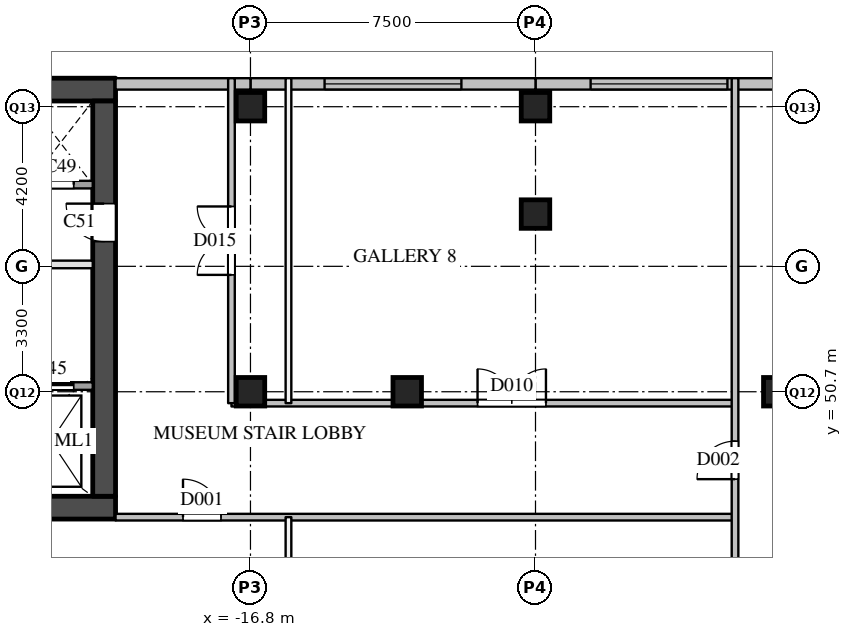
"""IFC4 building model, lengths in metres.
Left out: names, types, materials, properties, quantities, classifications, styles, units other than length and angle.
Written with IfcOpenShell. Run it as: python <this file> out.ifc"""

import sys

from ifc_helpers import new_model, si_unit, direction, frame, frame_2d, origin, origin_2d, place, context, subcontext, project, spatial, rectangle, extrude, element, fill, save


model = new_model("IFC4")
c1 = context("Model", 3, precision=1e-05, world=origin(), true_north=direction((0.0, 1.0)))
c2 = subcontext(c1, "Body", "Model", "MODEL_VIEW")
j1 = project(units=[si_unit("LENGTHUNIT", "METRE"), si_unit("PLANEANGLEUNIT", "RADIAN")], contexts=[c1])
p1 = place(None, origin())
s1 = spatial("IfcSite", under=j1, at=p1, CompositionType="ELEMENT")
p2 = place(p1, origin())
s2 = spatial("IfcBuilding", under=s1, at=p2, CompositionType="ELEMENT")
p3 = place(p2, frame((0.0, 0.0, 21.0)))
s3 = spatial("IfcBuildingStorey", under=s2, at=p3, CompositionType="ELEMENT", Elevation=21.0)
for number, where, z_axis, x_axis in (
    (1, (-16.8, 50.7, 0.0), (0.0, 0.0, 1.0), (1.0, 0.0, 0.0)),
    (2, (-16.8, 58.2, 0.0), (0.0, 0.0, 1.0), (1.0, 0.0, 0.0)),
    (3, (-9.3, 58.2, 0.0), (0.0, 0.0, 1.0), (1.0, 0.0, 0.0)),
    (4, (-12.675, 50.7, 0.0), (0.0, 0.0, 1.0), (1.0, 0.0, 0.0)),
    (5, (-9.3, 55.375, 0.0), (0.0, 0.0, 1.0), (1.0, 0.0, 0.0)),
    (6, (-2.925, 50.7, 0.0), (0.0, 0.0, 1.0), (1.0, 0.0, 0.0)),
):
    element("IfcColumn", number, at=place(p3, frame(where, z_axis=z_axis, x_axis=x_axis)), inside=s3, PredefinedType="COLUMN", context=c2, shape_type="SweptSolid", body=[
        extrude(rectangle(XDim=0.75, YDim=0.75, at=origin_2d()), origin(), (0.0, 0.0, 1.0), 5.0),
    ])
p4 = place(p3, frame((-1.8, 58.8, 0.0), z_axis=(0.0, 0.0, 1.0), x_axis=(-1.0, 0.0, 0.0)))
e7 = element("IfcWall", 7, at=p4, inside=s3, PredefinedType="SOLIDWALL", context=c2, shape_type="SweptSolid", body=[
    extrude(rectangle(XDim=7.5, YDim=0.3, at=frame_2d((3.75, 0.0))), origin(), (0.0, 0.0, 1.0), 4.59),
])
p5 = place(p4, frame((2.45, 0.0, 2.4)))
e8 = element("IfcOpeningElement", 8, at=p5, cuts=e7, PredefinedType="OPENING", context=c2, shape_type="SweptSolid", body=[
    extrude(rectangle(XDim=3.6, YDim=1.2, at=frame_2d((1.8, 0.6))), frame((0.0, 0.16, 0.0), z_axis=(0.0, -1.0, 0.0), x_axis=(1.0, 0.0, 0.0)), (0.0, 0.0, 1.0), 0.32),
])
p6 = place(p3, frame((-9.3, 58.8, 0.0), z_axis=(0.0, 0.0, 1.0), x_axis=(-1.0, 0.0, 0.0)))
e9 = element("IfcWall", 9, at=p6, inside=s3, PredefinedType="SOLIDWALL", context=c2, shape_type="SweptSolid", body=[
    extrude(rectangle(XDim=7.5, YDim=0.3, at=frame_2d((3.75, 0.0))), origin(), (0.0, 0.0, 1.0), 4.59),
])
p7 = place(p6, frame((1.95, 0.0, 2.4)))
e10 = element("IfcOpeningElement", 10, at=p7, cuts=e9, PredefinedType="OPENING", context=c2, shape_type="SweptSolid", body=[
    extrude(rectangle(XDim=3.6, YDim=1.2, at=frame_2d((1.8, 0.6))), frame((0.0, 0.16, 0.0), z_axis=(0.0, -1.0, 0.0), x_axis=(1.0, 0.0, 0.0)), (0.0, 0.0, 1.0), 0.32),
])
p8 = place(p3, frame((-16.8, 58.8, 0.0), z_axis=(0.0, 0.0, 1.0), x_axis=(-1.0, 0.0, 0.0)))
e11 = element("IfcWall", 11, at=p8, inside=s3, PredefinedType="SOLIDWALL", context=c2, shape_type="SweptSolid", body=[
    extrude(rectangle(XDim=3.55, YDim=0.3, at=frame_2d((1.775, 0.0))), origin(), (0.0, 0.0, 1.0), 4.59),
])
p9 = place(p3, frame((-32.55, 47.65, 0.0), z_axis=(0.0, 0.0, 1.0), x_axis=(1.0, 0.0, 0.0)))
e12 = element("IfcWall", 12, at=p9, inside=s3, PredefinedType="SHEAR", context=c2, shape_type="SweptSolid", body=[
    extrude(rectangle(XDim=12.2, YDim=0.6, at=frame_2d((6.1, 0.0))), origin(), (0.0, 0.0, 1.0), 4.55),
])
p10 = place(p9, frame((8.0, 0.0, 0.0)))
e13 = element("IfcOpeningElement", 13, at=p10, cuts=e12, PredefinedType="OPENING", context=c2, shape_type="SweptSolid", body=[
    extrude(rectangle(XDim=0.7, YDim=2.1, at=frame_2d((0.35, 1.05))), frame((0.0, 0.31, 0.0), z_axis=(0.0, -1.0, 0.0), x_axis=(1.0, 0.0, 0.0)), (0.0, 0.0, 1.0), 0.62),
])
p11 = place(p3, frame((-32.55, 58.65, 0.0), z_axis=(0.0, 0.0, 1.0), x_axis=(1.0, 0.0, 0.0)))
e14 = element("IfcWall", 14, at=p11, inside=s3, PredefinedType="SHEAR", context=c2, shape_type="SweptSolid", body=[
    extrude(rectangle(XDim=12.2, YDim=0.6, at=frame_2d((6.1, 0.0))), origin(), (0.0, 0.0, 1.0), 4.55),
])
p12 = place(p3, frame((-20.65, 47.95, 0.0), z_axis=(0.0, 0.0, 1.0), x_axis=(0.0, 1.0, 0.0)))
e15 = element("IfcWall", 15, at=p12, inside=s3, PredefinedType="SHEAR", context=c2, shape_type="SweptSolid", body=[
    extrude(rectangle(XDim=10.4, YDim=0.6, at=frame_2d((5.2, 0.0))), origin(), (0.0, 0.0, 1.0), 4.55),
])
p13 = place(p12, frame((6.7, 0.0, 0.0)))
e16 = element("IfcOpeningElement", 16, at=p13, cuts=e15, PredefinedType="OPENING", context=c2, shape_type="SweptSolid", body=[
    extrude(rectangle(XDim=1.0, YDim=2.1, at=frame_2d((0.5, 1.05))), frame((0.0, 0.31, 0.0), z_axis=(0.0, -1.0, 0.0), x_axis=(1.0, 0.0, 0.0)), (0.0, 0.0, 1.0), 0.62),
])
p14 = place(p3, frame((-25.25, 50.85, 0.0), z_axis=(0.0, 0.0, 1.0), x_axis=(1.0, 0.0, 0.0)))
e17 = element("IfcWall", 17, at=p14, inside=s3, PredefinedType="SOLIDWALL", context=c2, shape_type="SweptSolid", body=[
    extrude(rectangle(XDim=4.3, YDim=0.2, at=frame_2d((2.15, 0.0))), origin(), (0.0, 0.0, 1.0), 4.55),
])
p15 = place(p14, frame((2.6, 0.0, 0.0)))
e18 = element("IfcOpeningElement", 18, at=p15, cuts=e17, PredefinedType="OPENING", context=c2, shape_type="SweptSolid", body=[
    extrude(rectangle(XDim=1.2, YDim=2.1, at=frame_2d((0.6, 1.05))), frame((0.0, 0.11, 0.0), z_axis=(0.0, -1.0, 0.0), x_axis=(1.0, 0.0, 0.0)), (0.0, 0.0, 1.0), 0.22),
])
p16 = place(p3, frame((-25.25, 54.05, 0.0), z_axis=(0.0, 0.0, 1.0), x_axis=(1.0, 0.0, 0.0)))
e19 = element("IfcWall", 19, at=p16, inside=s3, PredefinedType="PARTITIONING", context=c2, shape_type="SweptSolid", body=[
    extrude(rectangle(XDim=4.3, YDim=0.2, at=frame_2d((2.15, 0.0))), origin(), (0.0, 0.0, 1.0), 4.55),
])
p17 = place(p16, frame((1.25, 0.0, 0.0)))
e20 = element("IfcOpeningElement", 20, at=p17, cuts=e19, PredefinedType="OPENING", context=c2, shape_type="SweptSolid", body=[
    extrude(rectangle(XDim=1.8, YDim=2.1, at=frame_2d((0.9, 1.05))), frame((0.0, 0.11, 0.0), z_axis=(0.0, -1.0, 0.0), x_axis=(1.0, 0.0, 0.0)), (0.0, 0.0, 1.0), 0.22),
])
p18 = place(p3, frame((-22.65, 56.15, 0.0), z_axis=(0.0, 0.0, 1.0), x_axis=(1.0, 0.0, 0.0)))
e21 = element("IfcWall", 21, at=p18, inside=s3, PredefinedType="SOLIDWALL", context=c2, shape_type="SweptSolid", body=[
    extrude(rectangle(XDim=1.7, YDim=0.2, at=frame_2d((0.85, 0.0))), origin(), (0.0, 0.0, 1.0), 4.55),
])
p19 = place(p18, frame((0.5, 0.0, 0.0)))
e22 = element("IfcOpeningElement", 22, at=p19, cuts=e21, PredefinedType="OPENING", context=c2, shape_type="SweptSolid", body=[
    extrude(rectangle(XDim=0.7, YDim=2.1, at=frame_2d((0.35, 1.05))), frame((0.0, 0.11, 0.0), z_axis=(0.0, -1.0, 0.0), x_axis=(1.0, 0.0, 0.0)), (0.0, 0.0, 1.0), 0.22),
])
p20 = place(p3, frame((-20.35, 47.4, 0.0), z_axis=(0.0, 0.0, 1.0), x_axis=(1.0, 0.0, 0.0)))
e23 = element("IfcWall", 23, at=p20, inside=s3, PredefinedType="PARTITIONING", context=c2, shape_type="SweptSolid", body=[
    extrude(rectangle(XDim=16.3, YDim=0.175, at=frame_2d((8.15, 0.0))), origin(), (0.0, 0.0, 1.0), 3.79),
])
p21 = place(p20, frame((1.775, 0.0, 0.0)))
e24 = element("IfcOpeningElement", 24, at=p21, cuts=e23, PredefinedType="OPENING", context=c2, shape_type="SweptSolid", body=[
    extrude(rectangle(XDim=1.0, YDim=2.1, at=frame_2d((0.5, 1.05))), frame((0.0, 0.097, 0.0), z_axis=(0.0, -1.0, 0.0), x_axis=(1.0, 0.0, 0.0)), (0.0, 0.0, 1.0), 0.195),
])
p22 = place(p3, frame((-17.3, 50.4, 0.0), z_axis=(0.0, 0.0, 1.0), x_axis=(1.0, 0.0, 0.0)))
e25 = element("IfcWall", 25, at=p22, inside=s3, PredefinedType="PARTITIONING", context=c2, shape_type="SweptSolid", body=[
    extrude(rectangle(XDim=13.25, YDim=0.175, at=frame_2d((6.625, 0.0))), origin(), (0.0, 0.0, 1.0), 4.55),
])
p23 = place(p22, frame((6.475, 0.0, 0.0)))
e26 = element("IfcOpeningElement", 26, at=p23, cuts=e25, PredefinedType="OPENING", context=c2, shape_type="SweptSolid", body=[
    extrude(rectangle(XDim=1.8, YDim=2.1, at=frame_2d((0.9, 1.05))), frame((0.0, 0.097, 0.0), z_axis=(0.0, -1.0, 0.0), x_axis=(1.0, 0.0, 0.0)), (0.0, 0.0, 1.0), 0.195),
])
p24 = place(p3, frame((-17.3, 50.4, 0.0), z_axis=(0.0, 0.0, 1.0), x_axis=(0.0, 1.0, 0.0)))
e27 = element("IfcWall", 27, at=p24, inside=s3, PredefinedType="PARTITIONING", context=c2, shape_type="SweptSolid", body=[
    extrude(rectangle(XDim=8.55, YDim=0.175, at=frame_2d((4.275, 0.0))), origin(), (0.0, 0.0, 1.0), 3.79),
])
p25 = place(p24, frame((3.375, 0.0, 0.0)))
e28 = element("IfcOpeningElement", 28, at=p25, cuts=e27, PredefinedType="OPENING", context=c2, shape_type="SweptSolid", body=[
    extrude(rectangle(XDim=1.8, YDim=2.1, at=frame_2d((0.9, 1.05))), frame((0.0, 0.097, 0.0), z_axis=(0.0, -1.0, 0.0), x_axis=(1.0, 0.0, 0.0)), (0.0, 0.0, 1.0), 0.195),
])
p26 = place(p3, frame((-4.05, -4.05, 0.0), z_axis=(0.0, 0.0, 1.0), x_axis=(0.0, 1.0, 0.0)))
e29 = element("IfcWall", 29, at=p26, inside=s3, PredefinedType="PARTITIONING", context=c2, shape_type="SweptSolid", body=[
    extrude(rectangle(XDim=63.0, YDim=0.175, at=frame_2d((31.5, 0.0))), origin(), (0.0, 0.0, 1.0), 3.79),
])
p27 = place(p26, frame((52.45, 0.0, 0.0)))
e30 = element("IfcOpeningElement", 30, at=p27, cuts=e29, PredefinedType="OPENING", context=c2, shape_type="SweptSolid", body=[
    extrude(rectangle(XDim=1.0, YDim=2.1, at=frame_2d((0.5, 1.05))), frame((0.0, 0.097, 0.0), z_axis=(0.0, -1.0, 0.0), x_axis=(1.0, 0.0, 0.0)), (0.0, 0.0, 1.0), 0.195),
])
p28 = place(p26, frame((7.525, 0.0, 0.0)))
e31 = element("IfcOpeningElement", 31, at=p28, cuts=e29, PredefinedType="OPENING", context=c2, shape_type="SweptSolid", body=[
    extrude(rectangle(XDim=1.0, YDim=2.1, at=frame_2d((0.5, 1.05))), frame((0.0, 0.097, 0.0), z_axis=(0.0, -1.0, 0.0), x_axis=(1.0, 0.0, 0.0)), (0.0, 0.0, 1.0), 0.195),
])
p29 = place(p26, frame((21.05, 0.0, 0.0)))
e32 = element("IfcOpeningElement", 32, at=p29, cuts=e29, PredefinedType="OPENING", context=c2, shape_type="SweptSolid", body=[
    extrude(rectangle(XDim=1.8, YDim=2.1, at=frame_2d((0.9, 1.05))), frame((0.0, 0.097, 0.0), z_axis=(0.0, -1.0, 0.0), x_axis=(1.0, 0.0, 0.0)), (0.0, 0.0, 1.0), 0.195),
])
p30 = place(p26, frame((32.85, 0.0, 0.0)))
e33 = element("IfcOpeningElement", 33, at=p30, cuts=e29, PredefinedType="OPENING", context=c2, shape_type="SweptSolid", body=[
    extrude(rectangle(XDim=1.8, YDim=2.1, at=frame_2d((0.9, 1.05))), frame((0.0, 0.097, 0.0), z_axis=(0.0, -1.0, 0.0), x_axis=(1.0, 0.0, 0.0)), (0.0, 0.0, 1.0), 0.195),
])
p31 = place(p26, frame((44.65, 0.0, 0.0)))
e34 = element("IfcOpeningElement", 34, at=p31, cuts=e29, PredefinedType="OPENING", context=c2, shape_type="SweptSolid", body=[
    extrude(rectangle(XDim=1.8, YDim=2.1, at=frame_2d((0.9, 1.05))), frame((0.0, 0.097, 0.0), z_axis=(0.0, -1.0, 0.0), x_axis=(1.0, 0.0, 0.0)), (0.0, 0.0, 1.0), 0.195),
])
p32 = place(p3, frame((-15.8, 30.0, 0.0), z_axis=(0.0, 0.0, 1.0), x_axis=(0.0, 1.0, 0.0)))
e35 = element("IfcWall", 35, at=p32, inside=s3, PredefinedType="PARTITIONING", context=c2, shape_type="SweptSolid", body=[
    extrude(rectangle(XDim=17.4, YDim=0.15, at=frame_2d((8.7, 0.0))), origin(), (0.0, 0.0, 1.0), 3.79),
])
p33 = place(p3, frame((-15.8, 50.4, 0.0), z_axis=(0.0, 0.0, 1.0), x_axis=(0.0, 1.0, 0.0)))
e36 = element("IfcWall", 36, at=p33, inside=s3, PredefinedType="PARTITIONING", context=c2, shape_type="SweptSolid", body=[
    extrude(rectangle(XDim=8.55, YDim=0.15, at=frame_2d((4.275, 0.0))), origin(), (0.0, 0.0, 1.0), 3.79),
])
p34 = place(p5, origin())
e37 = element("IfcWindow", 37, at=p34, inside=s3, PartitioningType="SINGLE_PANEL", PredefinedType="WINDOW", context=c2, shape_type="SweptSolid", body=[
    extrude(rectangle(XDim=3.6, YDim=1.2, at=frame_2d((1.8, 0.6))), frame((0.0, 0.03, 0.0), z_axis=(0.0, -1.0, 0.0), x_axis=(1.0, 0.0, 0.0)), (0.0, 0.0, 1.0), 0.06),
])
fill(e8, e37)
p35 = place(p7, origin())
e38 = element("IfcWindow", 38, at=p35, inside=s3, PartitioningType="SINGLE_PANEL", PredefinedType="WINDOW", context=c2, shape_type="SweptSolid", body=[
    extrude(rectangle(XDim=3.6, YDim=1.2, at=frame_2d((1.8, 0.6))), frame((0.0, 0.03, 0.0), z_axis=(0.0, -1.0, 0.0), x_axis=(1.0, 0.0, 0.0)), (0.0, 0.0, 1.0), 0.06),
])
fill(e10, e38)
p36 = place(p15, origin())
e39 = element("IfcDoor", 39, at=p36, inside=s3, OperationType="SLIDING_TO_LEFT", PredefinedType="DOOR", context=c2, shape_type="SweptSolid", body=[
    extrude(rectangle(XDim=1.2, YDim=2.1, at=frame_2d((0.6, 1.05))), frame((0.0, 0.025, 0.0), z_axis=(0.0, -1.0, 0.0), x_axis=(1.0, 0.0, 0.0)), (0.0, 0.0, 1.0), 0.05),
])
fill(e18, e39)
p37 = place(p19, origin())
e40 = element("IfcDoor", 40, at=p37, inside=s3, OperationType="SINGLE_SWING_RIGHT", PredefinedType="DOOR", context=c2, shape_type="SweptSolid", body=[
    extrude(rectangle(XDim=0.7, YDim=2.1, at=frame_2d((0.35, 1.05))), frame((0.0, 0.025, 0.0), z_axis=(0.0, -1.0, 0.0), x_axis=(1.0, 0.0, 0.0)), (0.0, 0.0, 1.0), 0.05),
])
fill(e22, e40)
p38 = place(p13, origin())
e41 = element("IfcDoor", 41, at=p38, inside=s3, OperationType="SINGLE_SWING_RIGHT", PredefinedType="DOOR", context=c2, shape_type="SweptSolid", body=[
    extrude(rectangle(XDim=1.0, YDim=2.1, at=frame_2d((0.5, 1.05))), frame((0.0, 0.025, 0.0), z_axis=(0.0, -1.0, 0.0), x_axis=(1.0, 0.0, 0.0)), (0.0, 0.0, 1.0), 0.05),
])
fill(e16, e41)
p39 = place(p21, origin())
e42 = element("IfcDoor", 42, at=p39, inside=s3, OperationType="SINGLE_SWING_LEFT", PredefinedType="DOOR", context=c2, shape_type="SweptSolid", body=[
    extrude(rectangle(XDim=1.0, YDim=2.1, at=frame_2d((0.5, 1.05))), frame((0.0, 0.025, 0.0), z_axis=(0.0, -1.0, 0.0), x_axis=(1.0, 0.0, 0.0)), (0.0, 0.0, 1.0), 0.05),
])
fill(e24, e42)
p40 = place(p27, origin())
e43 = element("IfcDoor", 43, at=p40, inside=s3, OperationType="SINGLE_SWING_LEFT", PredefinedType="DOOR", context=c2, shape_type="SweptSolid", body=[
    extrude(rectangle(XDim=1.0, YDim=2.1, at=frame_2d((0.5, 1.05))), frame((0.0, 0.025, 0.0), z_axis=(0.0, -1.0, 0.0), x_axis=(1.0, 0.0, 0.0)), (0.0, 0.0, 1.0), 0.05),
])
fill(e30, e43)
p41 = place(p23, origin())
e44 = element("IfcDoor", 44, at=p41, inside=s3, OperationType="DOUBLE_DOOR_SINGLE_SWING", PredefinedType="DOOR", context=c2, shape_type="SweptSolid", body=[
    extrude(rectangle(XDim=1.8, YDim=2.1, at=frame_2d((0.9, 1.05))), frame((0.0, 0.025, 0.0), z_axis=(0.0, -1.0, 0.0), x_axis=(1.0, 0.0, 0.0)), (0.0, 0.0, 1.0), 0.05),
])
fill(e26, e44)
p42 = place(p25, origin())
e45 = element("IfcDoor", 45, at=p42, inside=s3, OperationType="DOUBLE_DOOR_SINGLE_SWING", PredefinedType="DOOR", context=c2, shape_type="SweptSolid", body=[
    extrude(rectangle(XDim=1.8, YDim=2.1, at=frame_2d((0.9, 1.05))), frame((0.0, 0.025, 0.0), z_axis=(0.0, -1.0, 0.0), x_axis=(1.0, 0.0, 0.0)), (0.0, 0.0, 1.0), 0.05),
])
fill(e28, e45)
save(model, sys.argv[1])
